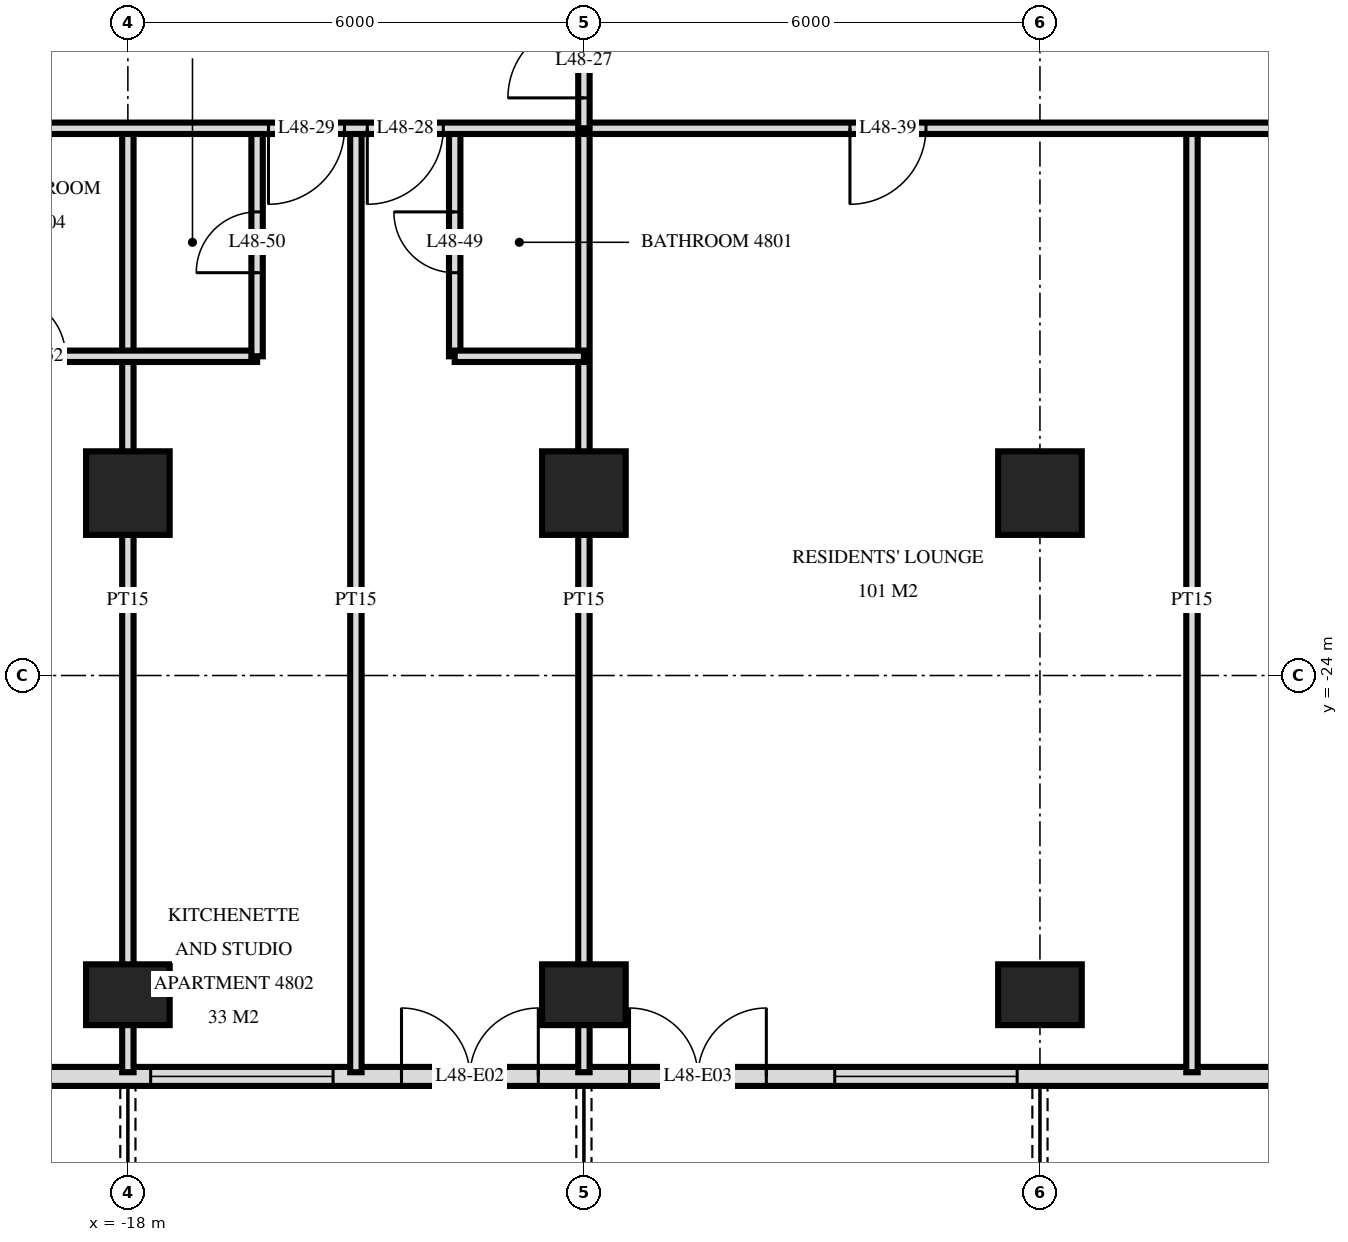
"""IFC4 building model, lengths in metres.
Left out: names, types, materials, properties, quantities, classifications, styles, units other than length and angle.
Written with IfcOpenShell. Run it as: python <this file> out.ifc"""

import sys

from ifc_helpers import new_model, si_unit, direction, frame, frame_2d, origin, origin_2d, place, context, subcontext, project, spatial, rectangle, extrude, element, fill, save


model = new_model("IFC4")
c1 = context("Model", 3, precision=1e-05, world=origin(), true_north=direction((0.0, 1.0)))
c2 = subcontext(c1, "Body", "Model", "MODEL_VIEW")
j1 = project(units=[si_unit("LENGTHUNIT", "METRE"), si_unit("PLANEANGLEUNIT", "RADIAN")], contexts=[c1])
p1 = place(None, origin())
s1 = spatial("IfcSite", under=j1, at=p1, CompositionType="ELEMENT")
p2 = place(p1, origin())
s2 = spatial("IfcBuilding", under=s1, at=p2, CompositionType="ELEMENT")
p3 = place(p2, frame((0.0, 0.0, 187.1)))
s3 = spatial("IfcBuildingStorey", under=s2, at=p3, CompositionType="ELEMENT", Elevation=187.1)
p4 = place(p3, frame((-18.0, -28.2, 0.0), z_axis=(0.0, 0.0, 1.0), x_axis=(1.0, 0.0, 0.0)))
e1 = element("IfcColumn", 1, at=p4, inside=s3, PredefinedType="COLUMN", context=c2, shape_type="SweptSolid", body=[
    extrude(rectangle(XDim=1.1, YDim=0.8, at=origin_2d()), origin(), (0.0, 0.0, 1.0), 3.5),
])
p5 = place(p3, frame((-18.0, -21.6, 0.0), z_axis=(0.0, 0.0, 1.0), x_axis=(1.0, 0.0, 0.0)))
e2 = element("IfcColumn", 2, at=p5, inside=s3, PredefinedType="COLUMN", context=c2, shape_type="SweptSolid", body=[
    extrude(rectangle(XDim=1.1, YDim=1.1, at=origin_2d()), origin(), (0.0, 0.0, 1.0), 3.5),
])
p6 = place(p3, frame((-12.0, -28.2, 0.0), z_axis=(0.0, 0.0, 1.0), x_axis=(1.0, 0.0, 0.0)))
e3 = element("IfcColumn", 3, at=p6, inside=s3, PredefinedType="COLUMN", context=c2, shape_type="SweptSolid", body=[
    extrude(rectangle(XDim=1.1, YDim=0.8, at=origin_2d()), origin(), (0.0, 0.0, 1.0), 3.5),
])
p7 = place(p3, frame((-12.0, -21.6, 0.0), z_axis=(0.0, 0.0, 1.0), x_axis=(1.0, 0.0, 0.0)))
e4 = element("IfcColumn", 4, at=p7, inside=s3, PredefinedType="COLUMN", context=c2, shape_type="SweptSolid", body=[
    extrude(rectangle(XDim=1.1, YDim=1.1, at=origin_2d()), origin(), (0.0, 0.0, 1.0), 3.5),
])
p8 = place(p3, frame((-6.0, -28.2, 0.0), z_axis=(0.0, 0.0, 1.0), x_axis=(1.0, 0.0, 0.0)))
e5 = element("IfcColumn", 5, at=p8, inside=s3, PredefinedType="COLUMN", context=c2, shape_type="SweptSolid", body=[
    extrude(rectangle(XDim=1.1, YDim=0.8, at=origin_2d()), origin(), (0.0, 0.0, 1.0), 3.5),
])
p9 = place(p3, frame((-6.0, -21.6, 0.0), z_axis=(0.0, 0.0, 1.0), x_axis=(1.0, 0.0, 0.0)))
e6 = element("IfcColumn", 6, at=p9, inside=s3, PredefinedType="COLUMN", context=c2, shape_type="SweptSolid", body=[
    extrude(rectangle(XDim=1.1, YDim=1.1, at=origin_2d()), origin(), (0.0, 0.0, 1.0), 3.5),
])
p10 = place(p3, frame((-22.475, -29.275, 0.0), z_axis=(0.0, 0.0, 1.0), x_axis=(1.0, 0.0, 0.0)))
e7 = element("IfcWall", 7, at=p10, inside=s3, PredefinedType="SOLIDWALL", context=c2, shape_type="SweptSolid", body=[
    extrude(rectangle(XDim=44.951, YDim=0.25, at=frame_2d((22.475, 0.0))), origin(), (0.0, 0.0, 1.0), 3.22),
])
p11 = place(p10, frame((0.575, 0.0, 0.0)))
e8 = element("IfcOpeningElement", 8, at=p11, cuts=e7, PredefinedType="OPENING", context=c2, shape_type="SweptSolid", body=[
    extrude(rectangle(XDim=1.8, YDim=2.4, at=frame_2d((0.9, 1.2))), frame((0.0, 0.135, 0.0), z_axis=(0.0, -1.0, 0.0), x_axis=(1.0, 0.0, 0.0)), (0.0, 0.0, 1.0), 0.27),
])
p12 = place(p10, frame((4.775, 0.0, 0.9)))
e9 = element("IfcOpeningElement", 9, at=p12, cuts=e7, PredefinedType="OPENING", context=c2, shape_type="SweptSolid", body=[
    extrude(rectangle(XDim=2.4, YDim=1.5, at=frame_2d((1.2, 0.75))), frame((0.0, 0.135, 0.0), z_axis=(0.0, -1.0, 0.0), x_axis=(1.0, 0.0, 0.0)), (0.0, 0.0, 1.0), 0.27),
])
p13 = place(p10, frame((8.075, 0.0, 0.0)))
e10 = element("IfcOpeningElement", 10, at=p13, cuts=e7, PredefinedType="OPENING", context=c2, shape_type="SweptSolid", body=[
    extrude(rectangle(XDim=1.8, YDim=2.4, at=frame_2d((0.9, 1.2))), frame((0.0, 0.135, 0.0), z_axis=(0.0, -1.0, 0.0), x_axis=(1.0, 0.0, 0.0)), (0.0, 0.0, 1.0), 0.27),
])
p14 = place(p10, frame((11.075, 0.0, 0.0)))
e11 = element("IfcOpeningElement", 11, at=p14, cuts=e7, PredefinedType="OPENING", context=c2, shape_type="SweptSolid", body=[
    extrude(rectangle(XDim=1.8, YDim=2.4, at=frame_2d((0.9, 1.2))), frame((0.0, 0.135, 0.0), z_axis=(0.0, -1.0, 0.0), x_axis=(1.0, 0.0, 0.0)), (0.0, 0.0, 1.0), 0.27),
])
p15 = place(p10, frame((13.775, 0.0, 0.9)))
e12 = element("IfcOpeningElement", 12, at=p15, cuts=e7, PredefinedType="OPENING", context=c2, shape_type="SweptSolid", body=[
    extrude(rectangle(XDim=2.4, YDim=1.5, at=frame_2d((1.2, 0.75))), frame((0.0, 0.135, 0.0), z_axis=(0.0, -1.0, 0.0), x_axis=(1.0, 0.0, 0.0)), (0.0, 0.0, 1.0), 0.27),
])
p16 = place(p10, frame((20.075, 0.0, 0.0)))
e13 = element("IfcOpeningElement", 13, at=p16, cuts=e7, PredefinedType="OPENING", context=c2, shape_type="SweptSolid", body=[
    extrude(rectangle(XDim=1.8, YDim=2.4, at=frame_2d((0.9, 1.2))), frame((0.0, 0.135, 0.0), z_axis=(0.0, -1.0, 0.0), x_axis=(1.0, 0.0, 0.0)), (0.0, 0.0, 1.0), 0.27),
])
p17 = place(p10, frame((23.075, 0.0, 0.0)))
e14 = element("IfcOpeningElement", 14, at=p17, cuts=e7, PredefinedType="OPENING", context=c2, shape_type="SweptSolid", body=[
    extrude(rectangle(XDim=1.8, YDim=2.4, at=frame_2d((0.9, 1.2))), frame((0.0, 0.135, 0.0), z_axis=(0.0, -1.0, 0.0), x_axis=(1.0, 0.0, 0.0)), (0.0, 0.0, 1.0), 0.27),
])
p18 = place(p10, frame((29.075, 0.0, 0.0)))
e15 = element("IfcOpeningElement", 15, at=p18, cuts=e7, PredefinedType="OPENING", context=c2, shape_type="SweptSolid", body=[
    extrude(rectangle(XDim=1.8, YDim=2.4, at=frame_2d((0.9, 1.2))), frame((0.0, 0.135, 0.0), z_axis=(0.0, -1.0, 0.0), x_axis=(1.0, 0.0, 0.0)), (0.0, 0.0, 1.0), 0.27),
])
p19 = place(p10, frame((31.775, 0.0, 0.9)))
e16 = element("IfcOpeningElement", 16, at=p19, cuts=e7, PredefinedType="OPENING", context=c2, shape_type="SweptSolid", body=[
    extrude(rectangle(XDim=2.4, YDim=1.5, at=frame_2d((1.2, 0.75))), frame((0.0, 0.135, 0.0), z_axis=(0.0, -1.0, 0.0), x_axis=(1.0, 0.0, 0.0)), (0.0, 0.0, 1.0), 0.27),
])
p20 = place(p10, frame((35.075, 0.0, 0.0)))
e17 = element("IfcOpeningElement", 17, at=p20, cuts=e7, PredefinedType="OPENING", context=c2, shape_type="SweptSolid", body=[
    extrude(rectangle(XDim=1.8, YDim=2.4, at=frame_2d((0.9, 1.2))), frame((0.0, 0.135, 0.0), z_axis=(0.0, -1.0, 0.0), x_axis=(1.0, 0.0, 0.0)), (0.0, 0.0, 1.0), 0.27),
])
p21 = place(p10, frame((37.775, 0.0, 0.9)))
e18 = element("IfcOpeningElement", 18, at=p21, cuts=e7, PredefinedType="OPENING", context=c2, shape_type="SweptSolid", body=[
    extrude(rectangle(XDim=2.4, YDim=1.5, at=frame_2d((1.2, 0.75))), frame((0.0, 0.135, 0.0), z_axis=(0.0, -1.0, 0.0), x_axis=(1.0, 0.0, 0.0)), (0.0, 0.0, 1.0), 0.27),
])
p22 = place(p10, frame((41.075, 0.0, 0.0)))
e19 = element("IfcOpeningElement", 19, at=p22, cuts=e7, PredefinedType="OPENING", context=c2, shape_type="SweptSolid", body=[
    extrude(rectangle(XDim=1.8, YDim=2.4, at=frame_2d((0.9, 1.2))), frame((0.0, 0.135, 0.0), z_axis=(0.0, -1.0, 0.0), x_axis=(1.0, 0.0, 0.0)), (0.0, 0.0, 1.0), 0.27),
])
p23 = place(p3, frame((-4.0, -29.22, 0.0), z_axis=(0.0, 0.0, 1.0), x_axis=(0.0, 1.0, 0.0)))
e20 = element("IfcWall", 20, at=p23, inside=s3, PredefinedType="PARTITIONING", context=c2, shape_type="SweptSolid", body=[
    extrude(rectangle(XDim=12.42, YDim=0.15, at=frame_2d((6.21, 0.0))), origin(), (0.0, 0.0, 1.0), 3.22),
])
p24 = place(p3, frame((-12.0, -16.8, 0.0), z_axis=(0.0, 0.0, 1.0), x_axis=(0.0, 1.0, 0.0)))
e21 = element("IfcWall", 21, at=p24, inside=s3, PredefinedType="PARTITIONING", context=c2, shape_type="SweptSolid", body=[
    extrude(rectangle(XDim=1.75, YDim=0.15, at=frame_2d((0.875, 0.0))), origin(), (0.0, 0.0, 1.0), 3.22),
])
p25 = place(p24, frame((0.4, 0.0, 0.0)))
e22 = element("IfcOpeningElement", 22, at=p25, cuts=e21, PredefinedType="OPENING", context=c2, shape_type="SweptSolid", body=[
    extrude(rectangle(XDim=1.0, YDim=2.1, at=frame_2d((0.5, 1.05))), frame((0.0, 0.085, 0.0), z_axis=(0.0, -1.0, 0.0), x_axis=(1.0, 0.0, 0.0)), (0.0, 0.0, 1.0), 0.17),
])
p26 = place(p3, frame((-12.0, -29.22, 0.0), z_axis=(0.0, 0.0, 1.0), x_axis=(0.0, 1.0, 0.0)))
e23 = element("IfcWall", 23, at=p26, inside=s3, PredefinedType="PARTITIONING", context=c2, shape_type="SweptSolid", body=[
    extrude(rectangle(XDim=12.42, YDim=0.15, at=frame_2d((6.21, 0.0))), origin(), (0.0, 0.0, 1.0), 3.22),
])
p27 = place(p3, frame((-13.7, -19.8, 0.0), z_axis=(0.0, 0.0, 1.0), x_axis=(0.0, 1.0, 0.0)))
e24 = element("IfcWall", 24, at=p27, inside=s3, PredefinedType="PARTITIONING", context=c2, shape_type="SweptSolid", body=[
    extrude(rectangle(XDim=3.0, YDim=0.15, at=frame_2d((1.5, 0.0))), origin(), (0.0, 0.0, 1.0), 3.22),
])
p28 = place(p27, frame((1.1, 0.0, 0.0)))
e25 = element("IfcOpeningElement", 25, at=p28, cuts=e24, PredefinedType="OPENING", context=c2, shape_type="SweptSolid", body=[
    extrude(rectangle(XDim=0.8, YDim=2.1, at=frame_2d((0.4, 1.05))), frame((0.0, 0.085, 0.0), z_axis=(0.0, -1.0, 0.0), x_axis=(1.0, 0.0, 0.0)), (0.0, 0.0, 1.0), 0.17),
])
p29 = place(p3, frame((-15.0, -29.22, 0.0), z_axis=(0.0, 0.0, 1.0), x_axis=(0.0, 1.0, 0.0)))
e26 = element("IfcWall", 26, at=p29, inside=s3, PredefinedType="PARTITIONING", context=c2, shape_type="SweptSolid", body=[
    extrude(rectangle(XDim=12.42, YDim=0.15, at=frame_2d((6.21, 0.0))), origin(), (0.0, 0.0, 1.0), 3.22),
])
p30 = place(p3, frame((-16.3, -19.8, 0.0), z_axis=(0.0, 0.0, 1.0), x_axis=(0.0, 1.0, 0.0)))
e27 = element("IfcWall", 27, at=p30, inside=s3, PredefinedType="PARTITIONING", context=c2, shape_type="SweptSolid", body=[
    extrude(rectangle(XDim=3.0, YDim=0.15, at=frame_2d((1.5, 0.0))), origin(), (0.0, 0.0, 1.0), 3.22),
])
p31 = place(p30, frame((1.1, 0.0, 0.0)))
e28 = element("IfcOpeningElement", 28, at=p31, cuts=e27, PredefinedType="OPENING", context=c2, shape_type="SweptSolid", body=[
    extrude(rectangle(XDim=0.8, YDim=2.1, at=frame_2d((0.4, 1.05))), frame((0.0, 0.085, 0.0), z_axis=(0.0, -1.0, 0.0), x_axis=(1.0, 0.0, 0.0)), (0.0, 0.0, 1.0), 0.17),
])
p32 = place(p3, frame((-18.0, -29.22, 0.0), z_axis=(0.0, 0.0, 1.0), x_axis=(0.0, 1.0, 0.0)))
e29 = element("IfcWall", 29, at=p32, inside=s3, PredefinedType="PARTITIONING", context=c2, shape_type="SweptSolid", body=[
    extrude(rectangle(XDim=12.42, YDim=0.15, at=frame_2d((6.21, 0.0))), origin(), (0.0, 0.0, 1.0), 3.22),
])
p33 = place(p3, frame((-22.2, -19.8, 0.0), z_axis=(0.0, 0.0, 1.0), x_axis=(1.0, 0.0, 0.0)))
e30 = element("IfcWall", 30, at=p33, inside=s3, PredefinedType="PARTITIONING", context=c2, shape_type="SweptSolid", body=[
    extrude(rectangle(XDim=5.9, YDim=0.15, at=frame_2d((2.95, 0.0))), origin(), (0.0, 0.0, 1.0), 3.22),
])
p34 = place(p33, frame((2.58, 0.0, 0.0)))
e31 = element("IfcOpeningElement", 31, at=p34, cuts=e30, PredefinedType="OPENING", context=c2, shape_type="SweptSolid", body=[
    extrude(rectangle(XDim=0.8, YDim=2.1, at=frame_2d((0.4, 1.05))), frame((0.0, 0.085, 0.0), z_axis=(0.0, -1.0, 0.0), x_axis=(1.0, 0.0, 0.0)), (0.0, 0.0, 1.0), 0.17),
])
p35 = place(p3, frame((-13.7, -19.8, 0.0), z_axis=(0.0, 0.0, 1.0), x_axis=(1.0, 0.0, 0.0)))
e32 = element("IfcWall", 32, at=p35, inside=s3, PredefinedType="PARTITIONING", context=c2, shape_type="SweptSolid", body=[
    extrude(rectangle(XDim=1.7, YDim=0.15, at=frame_2d((0.85, 0.0))), origin(), (0.0, 0.0, 1.0), 3.22),
])
p36 = place(p3, frame((-26.82, -16.8, 0.0), z_axis=(0.0, 0.0, 1.0), x_axis=(1.0, 0.0, 0.0)))
e33 = element("IfcWall", 33, at=p36, inside=s3, PredefinedType="PARTITIONING", context=c2, shape_type="SweptSolid", body=[
    extrude(rectangle(XDim=53.64, YDim=0.15, at=frame_2d((26.82, 0.0))), origin(), (0.0, 0.0, 1.0), 3.22),
])
p37 = place(p36, frame((11.97, 0.0, 0.0)))
e34 = element("IfcOpeningElement", 34, at=p37, cuts=e33, PredefinedType="OPENING", context=c2, shape_type="SweptSolid", body=[
    extrude(rectangle(XDim=1.0, YDim=2.1, at=frame_2d((0.5, 1.05))), frame((0.0, 0.085, 0.0), z_axis=(0.0, -1.0, 0.0), x_axis=(1.0, 0.0, 0.0)), (0.0, 0.0, 1.0), 0.17),
])
p38 = place(p36, frame((10.67, 0.0, 0.0)))
e35 = element("IfcOpeningElement", 35, at=p38, cuts=e33, PredefinedType="OPENING", context=c2, shape_type="SweptSolid", body=[
    extrude(rectangle(XDim=1.0, YDim=2.1, at=frame_2d((0.5, 1.05))), frame((0.0, 0.085, 0.0), z_axis=(0.0, -1.0, 0.0), x_axis=(1.0, 0.0, 0.0)), (0.0, 0.0, 1.0), 0.17),
])
p39 = place(p36, frame((3.22, 0.0, 0.0)))
e36 = element("IfcOpeningElement", 36, at=p39, cuts=e33, PredefinedType="OPENING", context=c2, shape_type="SweptSolid", body=[
    extrude(rectangle(XDim=1.0, YDim=2.1, at=frame_2d((0.5, 1.05))), frame((0.0, 0.085, 0.0), z_axis=(0.0, -1.0, 0.0), x_axis=(1.0, 0.0, 0.0)), (0.0, 0.0, 1.0), 0.17),
])
p40 = place(p36, frame((5.02, 0.0, 0.0)))
e37 = element("IfcOpeningElement", 37, at=p40, cuts=e33, PredefinedType="OPENING", context=c2, shape_type="SweptSolid", body=[
    extrude(rectangle(XDim=1.0, YDim=2.1, at=frame_2d((0.5, 1.05))), frame((0.0, 0.085, 0.0), z_axis=(0.0, -1.0, 0.0), x_axis=(1.0, 0.0, 0.0)), (0.0, 0.0, 1.0), 0.17),
])
p41 = place(p36, frame((38.97, 0.0, 0.0)))
e38 = element("IfcOpeningElement", 38, at=p41, cuts=e33, PredefinedType="OPENING", context=c2, shape_type="SweptSolid", body=[
    extrude(rectangle(XDim=1.0, YDim=2.1, at=frame_2d((0.5, 1.05))), frame((0.0, 0.085, 0.0), z_axis=(0.0, -1.0, 0.0), x_axis=(1.0, 0.0, 0.0)), (0.0, 0.0, 1.0), 0.17),
])
p42 = place(p36, frame((48.72, 0.0, 0.0)))
e39 = element("IfcOpeningElement", 39, at=p42, cuts=e33, PredefinedType="OPENING", context=c2, shape_type="SweptSolid", body=[
    extrude(rectangle(XDim=1.0, YDim=2.1, at=frame_2d((0.5, 1.05))), frame((0.0, 0.085, 0.0), z_axis=(0.0, -1.0, 0.0), x_axis=(1.0, 0.0, 0.0)), (0.0, 0.0, 1.0), 0.17),
])
p43 = place(p36, frame((46.92, 0.0, 0.0)))
e40 = element("IfcOpeningElement", 40, at=p43, cuts=e33, PredefinedType="OPENING", context=c2, shape_type="SweptSolid", body=[
    extrude(rectangle(XDim=1.0, YDim=2.1, at=frame_2d((0.5, 1.05))), frame((0.0, 0.085, 0.0), z_axis=(0.0, -1.0, 0.0), x_axis=(1.0, 0.0, 0.0)), (0.0, 0.0, 1.0), 0.17),
])
p44 = place(p36, frame((18.32, 0.0, 0.0)))
e41 = element("IfcOpeningElement", 41, at=p44, cuts=e33, PredefinedType="OPENING", context=c2, shape_type="SweptSolid", body=[
    extrude(rectangle(XDim=1.0, YDim=2.1, at=frame_2d((0.5, 1.05))), frame((0.0, 0.085, 0.0), z_axis=(0.0, -1.0, 0.0), x_axis=(1.0, 0.0, 0.0)), (0.0, 0.0, 1.0), 0.17),
])
p45 = place(p36, frame((26.32, 0.0, 0.0)))
e42 = element("IfcOpeningElement", 42, at=p45, cuts=e33, PredefinedType="OPENING", context=c2, shape_type="SweptSolid", body=[
    extrude(rectangle(XDim=1.0, YDim=2.1, at=frame_2d((0.5, 1.05))), frame((0.0, 0.085, 0.0), z_axis=(0.0, -1.0, 0.0), x_axis=(1.0, 0.0, 0.0)), (0.0, 0.0, 1.0), 0.17),
])
p46 = place(p36, frame((34.32, 0.0, 0.0)))
e43 = element("IfcOpeningElement", 43, at=p46, cuts=e33, PredefinedType="OPENING", context=c2, shape_type="SweptSolid", body=[
    extrude(rectangle(XDim=1.0, YDim=2.1, at=frame_2d((0.5, 1.05))), frame((0.0, 0.085, 0.0), z_axis=(0.0, -1.0, 0.0), x_axis=(1.0, 0.0, 0.0)), (0.0, 0.0, 1.0), 0.17),
])
p47 = place(p12, origin())
e44 = element("IfcWindow", 44, at=p47, inside=s3, PartitioningType="SINGLE_PANEL", PredefinedType="WINDOW", context=c2, shape_type="SweptSolid", body=[
    extrude(rectangle(XDim=2.4, YDim=1.5, at=frame_2d((1.2, 0.75))), frame((0.0, 0.03, 0.0), z_axis=(0.0, -1.0, 0.0), x_axis=(1.0, 0.0, 0.0)), (0.0, 0.0, 1.0), 0.06),
])
fill(e9, e44)
p48 = place(p13, origin())
e45 = element("IfcDoor", 45, at=p48, inside=s3, OperationType="DOUBLE_DOOR_SINGLE_SWING", PredefinedType="DOOR", context=c2, shape_type="SweptSolid", body=[
    extrude(rectangle(XDim=1.8, YDim=2.4, at=frame_2d((0.9, 1.2))), frame((0.0, 0.025, 0.0), z_axis=(0.0, -1.0, 0.0), x_axis=(1.0, 0.0, 0.0)), (0.0, 0.0, 1.0), 0.05),
])
fill(e10, e45)
p49 = place(p14, origin())
e46 = element("IfcDoor", 46, at=p49, inside=s3, OperationType="DOUBLE_DOOR_SINGLE_SWING", PredefinedType="DOOR", context=c2, shape_type="SweptSolid", body=[
    extrude(rectangle(XDim=1.8, YDim=2.4, at=frame_2d((0.9, 1.2))), frame((0.0, 0.025, 0.0), z_axis=(0.0, -1.0, 0.0), x_axis=(1.0, 0.0, 0.0)), (0.0, 0.0, 1.0), 0.05),
])
fill(e11, e46)
p50 = place(p15, origin())
e47 = element("IfcWindow", 47, at=p50, inside=s3, PartitioningType="SINGLE_PANEL", PredefinedType="WINDOW", context=c2, shape_type="SweptSolid", body=[
    extrude(rectangle(XDim=2.4, YDim=1.5, at=frame_2d((1.2, 0.75))), frame((0.0, 0.03, 0.0), z_axis=(0.0, -1.0, 0.0), x_axis=(1.0, 0.0, 0.0)), (0.0, 0.0, 1.0), 0.06),
])
fill(e12, e47)
p51 = place(p25, origin())
e48 = element("IfcDoor", 48, at=p51, inside=s3, OperationType="SINGLE_SWING_RIGHT", PredefinedType="DOOR", context=c2, shape_type="SweptSolid", body=[
    extrude(rectangle(XDim=1.0, YDim=2.1, at=frame_2d((0.5, 1.05))), frame((0.0, 0.025, 0.0), z_axis=(0.0, -1.0, 0.0), x_axis=(1.0, 0.0, 0.0)), (0.0, 0.0, 1.0), 0.05),
])
fill(e22, e48)
p52 = place(p37, frame((0.5, 0.0, 0.0), z_axis=(0.0, 0.0, 1.0), x_axis=(-1.0, 0.0, 0.0)))
e49 = element("IfcDoor", 49, at=p52, inside=s3, OperationType="SINGLE_SWING_LEFT", PredefinedType="DOOR", context=c2, shape_type="SweptSolid", body=[
    extrude(rectangle(XDim=1.0, YDim=2.1, at=frame_2d((0.0, 1.05))), frame((0.0, -0.025, 0.0), z_axis=(0.0, 1.0, 0.0), x_axis=(-1.0, 0.0, 0.0)), (0.0, 0.0, 1.0), 0.05),
])
fill(e34, e49)
p53 = place(p38, frame((0.5, 0.0, 0.0), z_axis=(0.0, 0.0, 1.0), x_axis=(-1.0, 0.0, 0.0)))
e50 = element("IfcDoor", 50, at=p53, inside=s3, OperationType="SINGLE_SWING_LEFT", PredefinedType="DOOR", context=c2, shape_type="SweptSolid", body=[
    extrude(rectangle(XDim=1.0, YDim=2.1, at=frame_2d((0.0, 1.05))), frame((0.0, -0.025, 0.0), z_axis=(0.0, 1.0, 0.0), x_axis=(-1.0, 0.0, 0.0)), (0.0, 0.0, 1.0), 0.05),
])
fill(e35, e50)
p54 = place(p44, frame((0.5, 0.0, 0.0), z_axis=(0.0, 0.0, 1.0), x_axis=(-1.0, 0.0, 0.0)))
e51 = element("IfcDoor", 51, at=p54, inside=s3, OperationType="SINGLE_SWING_LEFT", PredefinedType="DOOR", context=c2, shape_type="SweptSolid", body=[
    extrude(rectangle(XDim=1.0, YDim=2.1, at=frame_2d((0.0, 1.05))), frame((0.0, -0.025, 0.0), z_axis=(0.0, 1.0, 0.0), x_axis=(-1.0, 0.0, 0.0)), (0.0, 0.0, 1.0), 0.05),
])
fill(e41, e51)
p55 = place(p28, origin())
e52 = element("IfcDoor", 52, at=p55, inside=s3, OperationType="SINGLE_SWING_LEFT", PredefinedType="DOOR", context=c2, shape_type="SweptSolid", body=[
    extrude(rectangle(XDim=0.8, YDim=2.1, at=frame_2d((0.4, 1.05))), frame((0.0, 0.025, 0.0), z_axis=(0.0, -1.0, 0.0), x_axis=(1.0, 0.0, 0.0)), (0.0, 0.0, 1.0), 0.05),
])
fill(e25, e52)
p56 = place(p31, origin())
e53 = element("IfcDoor", 53, at=p56, inside=s3, OperationType="SINGLE_SWING_RIGHT", PredefinedType="DOOR", context=c2, shape_type="SweptSolid", body=[
    extrude(rectangle(XDim=0.8, YDim=2.1, at=frame_2d((0.4, 1.05))), frame((0.0, 0.025, 0.0), z_axis=(0.0, -1.0, 0.0), x_axis=(1.0, 0.0, 0.0)), (0.0, 0.0, 1.0), 0.05),
])
fill(e28, e53)
p57 = place(p34, origin())
e54 = element("IfcDoor", 54, at=p57, inside=s3, OperationType="SINGLE_SWING_RIGHT", PredefinedType="DOOR", context=c2, shape_type="SweptSolid", body=[
    extrude(rectangle(XDim=0.8, YDim=2.1, at=frame_2d((0.4, 1.05))), frame((0.0, 0.025, 0.0), z_axis=(0.0, -1.0, 0.0), x_axis=(1.0, 0.0, 0.0)), (0.0, 0.0, 1.0), 0.05),
])
fill(e31, e54)
save(model, sys.argv[1])
